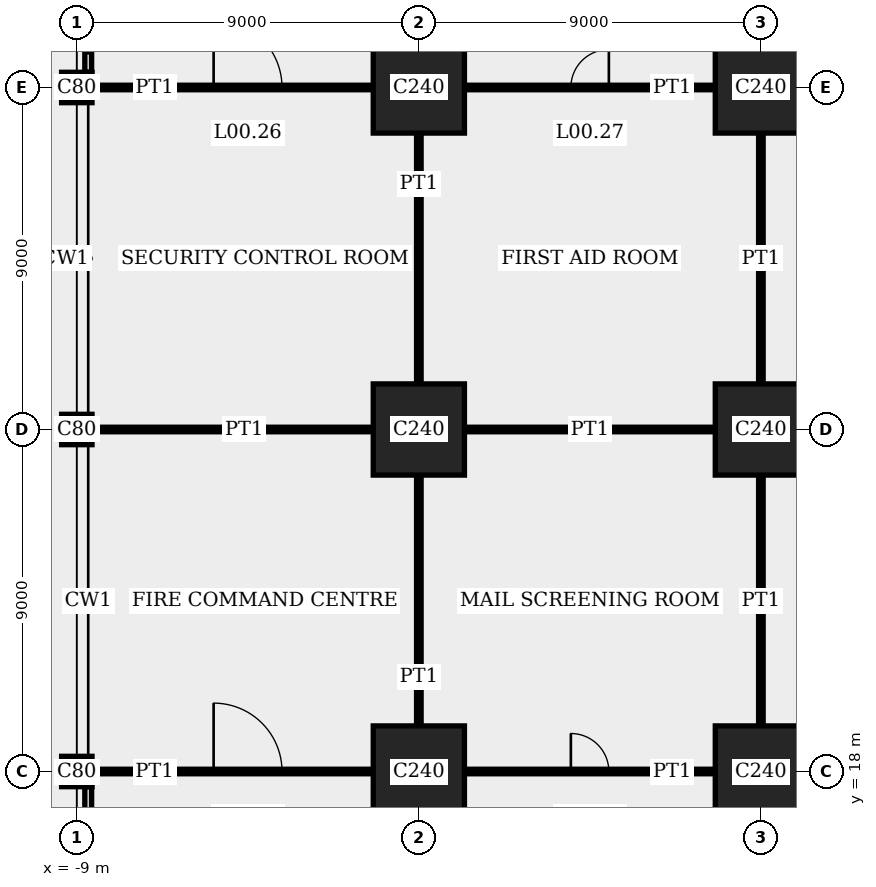
"""IFC4 building model, lengths in metres.
Left out: names, types, materials, properties, quantities, classifications, styles, units other than length and angle.
Written with IfcOpenShell. Run it as: python <this file> out.ifc"""

import sys

from ifc_helpers import new_model, si_unit, direction, frame, frame_2d, origin, origin_2d, place, context, subcontext, project, spatial, rectangle, extrude, element, fill, save


model = new_model("IFC4")
c1 = context("Model", 3, precision=1e-05, world=origin(), true_north=direction((0.0, 1.0)))
c2 = subcontext(c1, "Body", "Model", "MODEL_VIEW")
j1 = project(units=[si_unit("LENGTHUNIT", "METRE"), si_unit("PLANEANGLEUNIT", "RADIAN")], contexts=[c1])
p1 = place(None, origin())
s1 = spatial("IfcSite", under=j1, at=p1, CompositionType="ELEMENT")
p2 = place(p1, origin())
s2 = spatial("IfcBuilding", under=s1, at=p2, CompositionType="ELEMENT")
p3 = place(p2, origin())
s3 = spatial("IfcBuildingStorey", under=s2, at=p3, CompositionType="ELEMENT", Elevation=0.0)
for number, where, z_axis, x_axis in (
    (1, (-9.0, 18.0, 0.0), (0.0, 0.0, 1.0), (1.0, 0.0, 0.0)),
    (2, (-9.0, 27.0, 0.0), (0.0, 0.0, 1.0), (1.0, 0.0, 0.0)),
    (3, (-9.0, 36.0, 0.0), (0.0, 0.0, 1.0), (1.0, 0.0, 0.0)),
):
    element("IfcColumn", number, at=place(p3, frame(where, z_axis=z_axis, x_axis=x_axis)), inside=s3, PredefinedType="COLUMN", context=c2, shape_type="SweptSolid", body=[
        extrude(rectangle(XDim=0.8, YDim=0.8, at=origin_2d()), origin(), (0.0, 0.0, 1.0), 5.4),
    ])
for number, where, z_axis, x_axis in (
    (4, (0.0, 18.0, 0.0), (0.0, 0.0, 1.0), (1.0, 0.0, 0.0)),
    (5, (0.0, 27.0, 0.0), (0.0, 0.0, 1.0), (1.0, 0.0, 0.0)),
    (6, (0.0, 36.0, 0.0), (0.0, 0.0, 1.0), (1.0, 0.0, 0.0)),
    (7, (9.0, 18.0, 0.0), (0.0, 0.0, 1.0), (1.0, 0.0, 0.0)),
    (8, (9.0, 27.0, 0.0), (0.0, 0.0, 1.0), (1.0, 0.0, 0.0)),
    (9, (9.0, 36.0, 0.0), (0.0, 0.0, 1.0), (1.0, 0.0, 0.0)),
):
    element("IfcColumn", number, at=place(p3, frame(where, z_axis=z_axis, x_axis=x_axis)), inside=s3, PredefinedType="COLUMN", context=c2, shape_type="SweptSolid", body=[
        extrude(rectangle(XDim=2.4, YDim=2.4, at=origin_2d()), origin(), (0.0, 0.0, 1.0), 5.4),
    ])
p4 = place(p3, frame((-8.7, 9.4, 0.0), z_axis=(0.0, 0.0, 1.0), x_axis=(0.0, 1.0, 0.0)))
e10 = element("IfcWall", 10, at=p4, inside=s3, PredefinedType="SOLIDWALL", context=c2, shape_type="SweptSolid", body=[
    extrude(rectangle(XDim=8.2, YDim=0.18, at=frame_2d((4.1, 0.0))), origin(), (0.0, 0.0, 1.0), 4.3),
])
p5 = place(p4, frame((1.95, 0.0, 0.0)))
e11 = element("IfcOpeningElement", 11, at=p5, cuts=e10, PredefinedType="OPENING", context=c2, shape_type="SweptSolid", body=[
    extrude(rectangle(XDim=2.0, YDim=3.0, at=frame_2d((1.0, 1.5))), frame((0.0, 0.1, 0.0), z_axis=(0.0, -1.0, 0.0), x_axis=(1.0, 0.0, 0.0)), (0.0, 0.0, 1.0), 0.2),
])
p6 = place(p4, frame((4.25, 0.0, 0.0)))
e12 = element("IfcOpeningElement", 12, at=p6, cuts=e10, PredefinedType="OPENING", context=c2, shape_type="SweptSolid", body=[
    extrude(rectangle(XDim=2.0, YDim=3.0, at=frame_2d((1.0, 1.5))), frame((0.0, 0.1, 0.0), z_axis=(0.0, -1.0, 0.0), x_axis=(1.0, 0.0, 0.0)), (0.0, 0.0, 1.0), 0.2),
])
p7 = place(p3, frame((-8.7, 36.4, 0.0), z_axis=(0.0, 0.0, 1.0), x_axis=(0.0, 1.0, 0.0)))
e13 = element("IfcWall", 13, at=p7, inside=s3, PredefinedType="SOLIDWALL", context=c2, shape_type="SweptSolid", body=[
    extrude(rectangle(XDim=8.2, YDim=0.18, at=frame_2d((4.1, 0.0))), origin(), (0.0, 0.0, 1.0), 4.3),
])
p8 = place(p7, frame((3.2, 0.0, 0.0)))
e14 = element("IfcOpeningElement", 14, at=p8, cuts=e13, PredefinedType="OPENING", context=c2, shape_type="SweptSolid", body=[
    extrude(rectangle(XDim=1.8, YDim=2.4, at=frame_2d((0.9, 1.2))), frame((0.0, 0.1, 0.0), z_axis=(0.0, -1.0, 0.0), x_axis=(1.0, 0.0, 0.0)), (0.0, 0.0, 1.0), 0.2),
])
p9 = place(p7, frame((0.5, 0.0, 0.3)))
e15 = element("IfcOpeningElement", 15, at=p9, cuts=e13, PredefinedType="OPENING", context=c2, shape_type="SweptSolid", body=[
    extrude(rectangle(XDim=1.5, YDim=2.4, at=frame_2d((0.75, 1.2))), frame((0.0, 0.1, 0.0), z_axis=(0.0, -1.0, 0.0), x_axis=(1.0, 0.0, 0.0)), (0.0, 0.0, 1.0), 0.2),
])
p10 = place(p7, frame((6.2, 0.0, 0.3)))
e16 = element("IfcOpeningElement", 16, at=p10, cuts=e13, PredefinedType="OPENING", context=c2, shape_type="SweptSolid", body=[
    extrude(rectangle(XDim=1.5, YDim=2.4, at=frame_2d((0.75, 1.2))), frame((0.0, 0.1, 0.0), z_axis=(0.0, -1.0, 0.0), x_axis=(1.0, 0.0, 0.0)), (0.0, 0.0, 1.0), 0.2),
])
p11 = place(p3, frame((-8.6, 18.0, 0.0), z_axis=(0.0, 0.0, 1.0), x_axis=(1.0, 0.0, 0.0)))
e17 = element("IfcWall", 17, at=p11, inside=s3, PredefinedType="PARTITIONING", context=c2, shape_type="SweptSolid", body=[
    extrude(rectangle(XDim=7.4, YDim=0.12, at=frame_2d((3.7, 0.0))), origin(), (0.0, 0.0, 1.0), 4.3),
])
p12 = place(p11, frame((3.2, 0.0, 0.0)))
e18 = element("IfcOpeningElement", 18, at=p12, cuts=e17, PredefinedType="OPENING", context=c2, shape_type="SweptSolid", body=[
    extrude(rectangle(XDim=1.8, YDim=2.7, at=frame_2d((0.9, 1.35))), frame((0.0, 0.07, 0.0), z_axis=(0.0, -1.0, 0.0), x_axis=(1.0, 0.0, 0.0)), (0.0, 0.0, 1.0), 0.14),
])
p13 = place(p3, frame((1.2, 18.0, 0.0), z_axis=(0.0, 0.0, 1.0), x_axis=(1.0, 0.0, 0.0)))
e19 = element("IfcWall", 19, at=p13, inside=s3, PredefinedType="PARTITIONING", context=c2, shape_type="SweptSolid", body=[
    extrude(rectangle(XDim=6.6, YDim=0.12, at=frame_2d((3.3, 0.0))), origin(), (0.0, 0.0, 1.0), 4.3),
])
p14 = place(p13, frame((2.8, 0.0, 0.0)))
e20 = element("IfcOpeningElement", 20, at=p14, cuts=e19, PredefinedType="OPENING", context=c2, shape_type="SweptSolid", body=[
    extrude(rectangle(XDim=1.0, YDim=2.4, at=frame_2d((0.5, 1.2))), frame((0.0, 0.07, 0.0), z_axis=(0.0, -1.0, 0.0), x_axis=(1.0, 0.0, 0.0)), (0.0, 0.0, 1.0), 0.14),
])
p15 = place(p3, frame((-8.6, 36.0, 0.0), z_axis=(0.0, 0.0, 1.0), x_axis=(1.0, 0.0, 0.0)))
e21 = element("IfcWall", 21, at=p15, inside=s3, PredefinedType="PARTITIONING", context=c2, shape_type="SweptSolid", body=[
    extrude(rectangle(XDim=7.4, YDim=0.12, at=frame_2d((3.7, 0.0))), origin(), (0.0, 0.0, 1.0), 4.3),
])
p16 = place(p15, frame((3.2, 0.0, 0.0)))
e22 = element("IfcOpeningElement", 22, at=p16, cuts=e21, PredefinedType="OPENING", context=c2, shape_type="SweptSolid", body=[
    extrude(rectangle(XDim=1.8, YDim=2.7, at=frame_2d((0.9, 1.35))), frame((0.0, 0.07, 0.0), z_axis=(0.0, -1.0, 0.0), x_axis=(1.0, 0.0, 0.0)), (0.0, 0.0, 1.0), 0.14),
])
p17 = place(p3, frame((1.2, 36.0, 0.0), z_axis=(0.0, 0.0, 1.0), x_axis=(1.0, 0.0, 0.0)))
e23 = element("IfcWall", 23, at=p17, inside=s3, PredefinedType="PARTITIONING", context=c2, shape_type="SweptSolid", body=[
    extrude(rectangle(XDim=6.6, YDim=0.12, at=frame_2d((3.3, 0.0))), origin(), (0.0, 0.0, 1.0), 4.3),
])
p18 = place(p17, frame((2.8, 0.0, 0.0)))
e24 = element("IfcOpeningElement", 24, at=p18, cuts=e23, PredefinedType="OPENING", context=c2, shape_type="SweptSolid", body=[
    extrude(rectangle(XDim=1.0, YDim=2.4, at=frame_2d((0.5, 1.2))), frame((0.0, 0.07, 0.0), z_axis=(0.0, -1.0, 0.0), x_axis=(1.0, 0.0, 0.0)), (0.0, 0.0, 1.0), 0.14),
])
for number, where, z_axis, x_axis in (
    (25, (0.0, 19.2, 0.0), (0.0, 0.0, 1.0), (0.0, 1.0, 0.0)),
    (26, (0.0, 28.2, 0.0), (0.0, 0.0, 1.0), (0.0, 1.0, 0.0)),
):
    element("IfcWall", number, at=place(p3, frame(where, z_axis=z_axis, x_axis=x_axis)), inside=s3, PredefinedType="PARTITIONING", context=c2, shape_type="SweptSolid", body=[
        extrude(rectangle(XDim=6.6, YDim=0.12, at=frame_2d((3.3, 0.0))), origin(), (0.0, 0.0, 1.0), 4.3),
    ])
p19 = place(p3, frame((-8.6, 27.0, 0.0), z_axis=(0.0, 0.0, 1.0), x_axis=(1.0, 0.0, 0.0)))
e27 = element("IfcWall", 27, at=p19, inside=s3, PredefinedType="PARTITIONING", context=c2, shape_type="SweptSolid", body=[
    extrude(rectangle(XDim=7.4, YDim=0.12, at=frame_2d((3.7, 0.0))), origin(), (0.0, 0.0, 1.0), 4.3),
])
for number, where, z_axis, x_axis in (
    (28, (9.0, 19.2, 0.0), (0.0, 0.0, 1.0), (0.0, 1.0, 0.0)),
    (29, (9.0, 28.2, 0.0), (0.0, 0.0, 1.0), (0.0, 1.0, 0.0)),
    (30, (1.2, 27.0, 0.0), (0.0, 0.0, 1.0), (1.0, 0.0, 0.0)),
):
    element("IfcWall", number, at=place(p3, frame(where, z_axis=z_axis, x_axis=x_axis)), inside=s3, PredefinedType="PARTITIONING", context=c2, shape_type="SweptSolid", body=[
        extrude(rectangle(XDim=6.6, YDim=0.12, at=frame_2d((3.3, 0.0))), origin(), (0.0, 0.0, 1.0), 4.3),
    ])
p20 = place(p9, origin())
e31 = element("IfcWindow", 31, at=p20, inside=s3, PartitioningType="SINGLE_PANEL", PredefinedType="WINDOW", context=c2, shape_type="SweptSolid", body=[
    extrude(rectangle(XDim=1.5, YDim=2.4, at=frame_2d((0.75, 1.2))), frame((0.0, 0.03, 0.0), z_axis=(0.0, -1.0, 0.0), x_axis=(1.0, 0.0, 0.0)), (0.0, 0.0, 1.0), 0.06),
])
fill(e15, e31)
p21 = place(p12, origin())
e32 = element("IfcDoor", 32, at=p21, inside=s3, OperationType="DOUBLE_DOOR_DOUBLE_SWING", PredefinedType="DOOR", context=c2, shape_type="SweptSolid", body=[
    extrude(rectangle(XDim=1.8, YDim=2.7, at=frame_2d((0.9, 1.35))), frame((0.0, 0.025, 0.0), z_axis=(0.0, -1.0, 0.0), x_axis=(1.0, 0.0, 0.0)), (0.0, 0.0, 1.0), 0.05),
])
fill(e18, e32)
p22 = place(p14, origin())
e33 = element("IfcDoor", 33, at=p22, inside=s3, OperationType="SINGLE_SWING_RIGHT", PredefinedType="DOOR", context=c2, shape_type="SweptSolid", body=[
    extrude(rectangle(XDim=1.0, YDim=2.4, at=frame_2d((0.5, 1.2))), frame((0.0, 0.025, 0.0), z_axis=(0.0, -1.0, 0.0), x_axis=(1.0, 0.0, 0.0)), (0.0, 0.0, 1.0), 0.05),
])
fill(e20, e33)
p23 = place(p16, origin())
e34 = element("IfcDoor", 34, at=p23, inside=s3, OperationType="DOUBLE_DOOR_DOUBLE_SWING", PredefinedType="DOOR", context=c2, shape_type="SweptSolid", body=[
    extrude(rectangle(XDim=1.8, YDim=2.7, at=frame_2d((0.9, 1.35))), frame((0.0, 0.025, 0.0), z_axis=(0.0, -1.0, 0.0), x_axis=(1.0, 0.0, 0.0)), (0.0, 0.0, 1.0), 0.05),
])
fill(e22, e34)
p24 = place(p18, origin())
e35 = element("IfcDoor", 35, at=p24, inside=s3, OperationType="SINGLE_SWING_LEFT", PredefinedType="DOOR", context=c2, shape_type="SweptSolid", body=[
    extrude(rectangle(XDim=1.0, YDim=2.4, at=frame_2d((0.5, 1.2))), frame((0.0, 0.025, 0.0), z_axis=(0.0, -1.0, 0.0), x_axis=(1.0, 0.0, 0.0)), (0.0, 0.0, 1.0), 0.05),
])
fill(e24, e35)
save(model, sys.argv[1])
